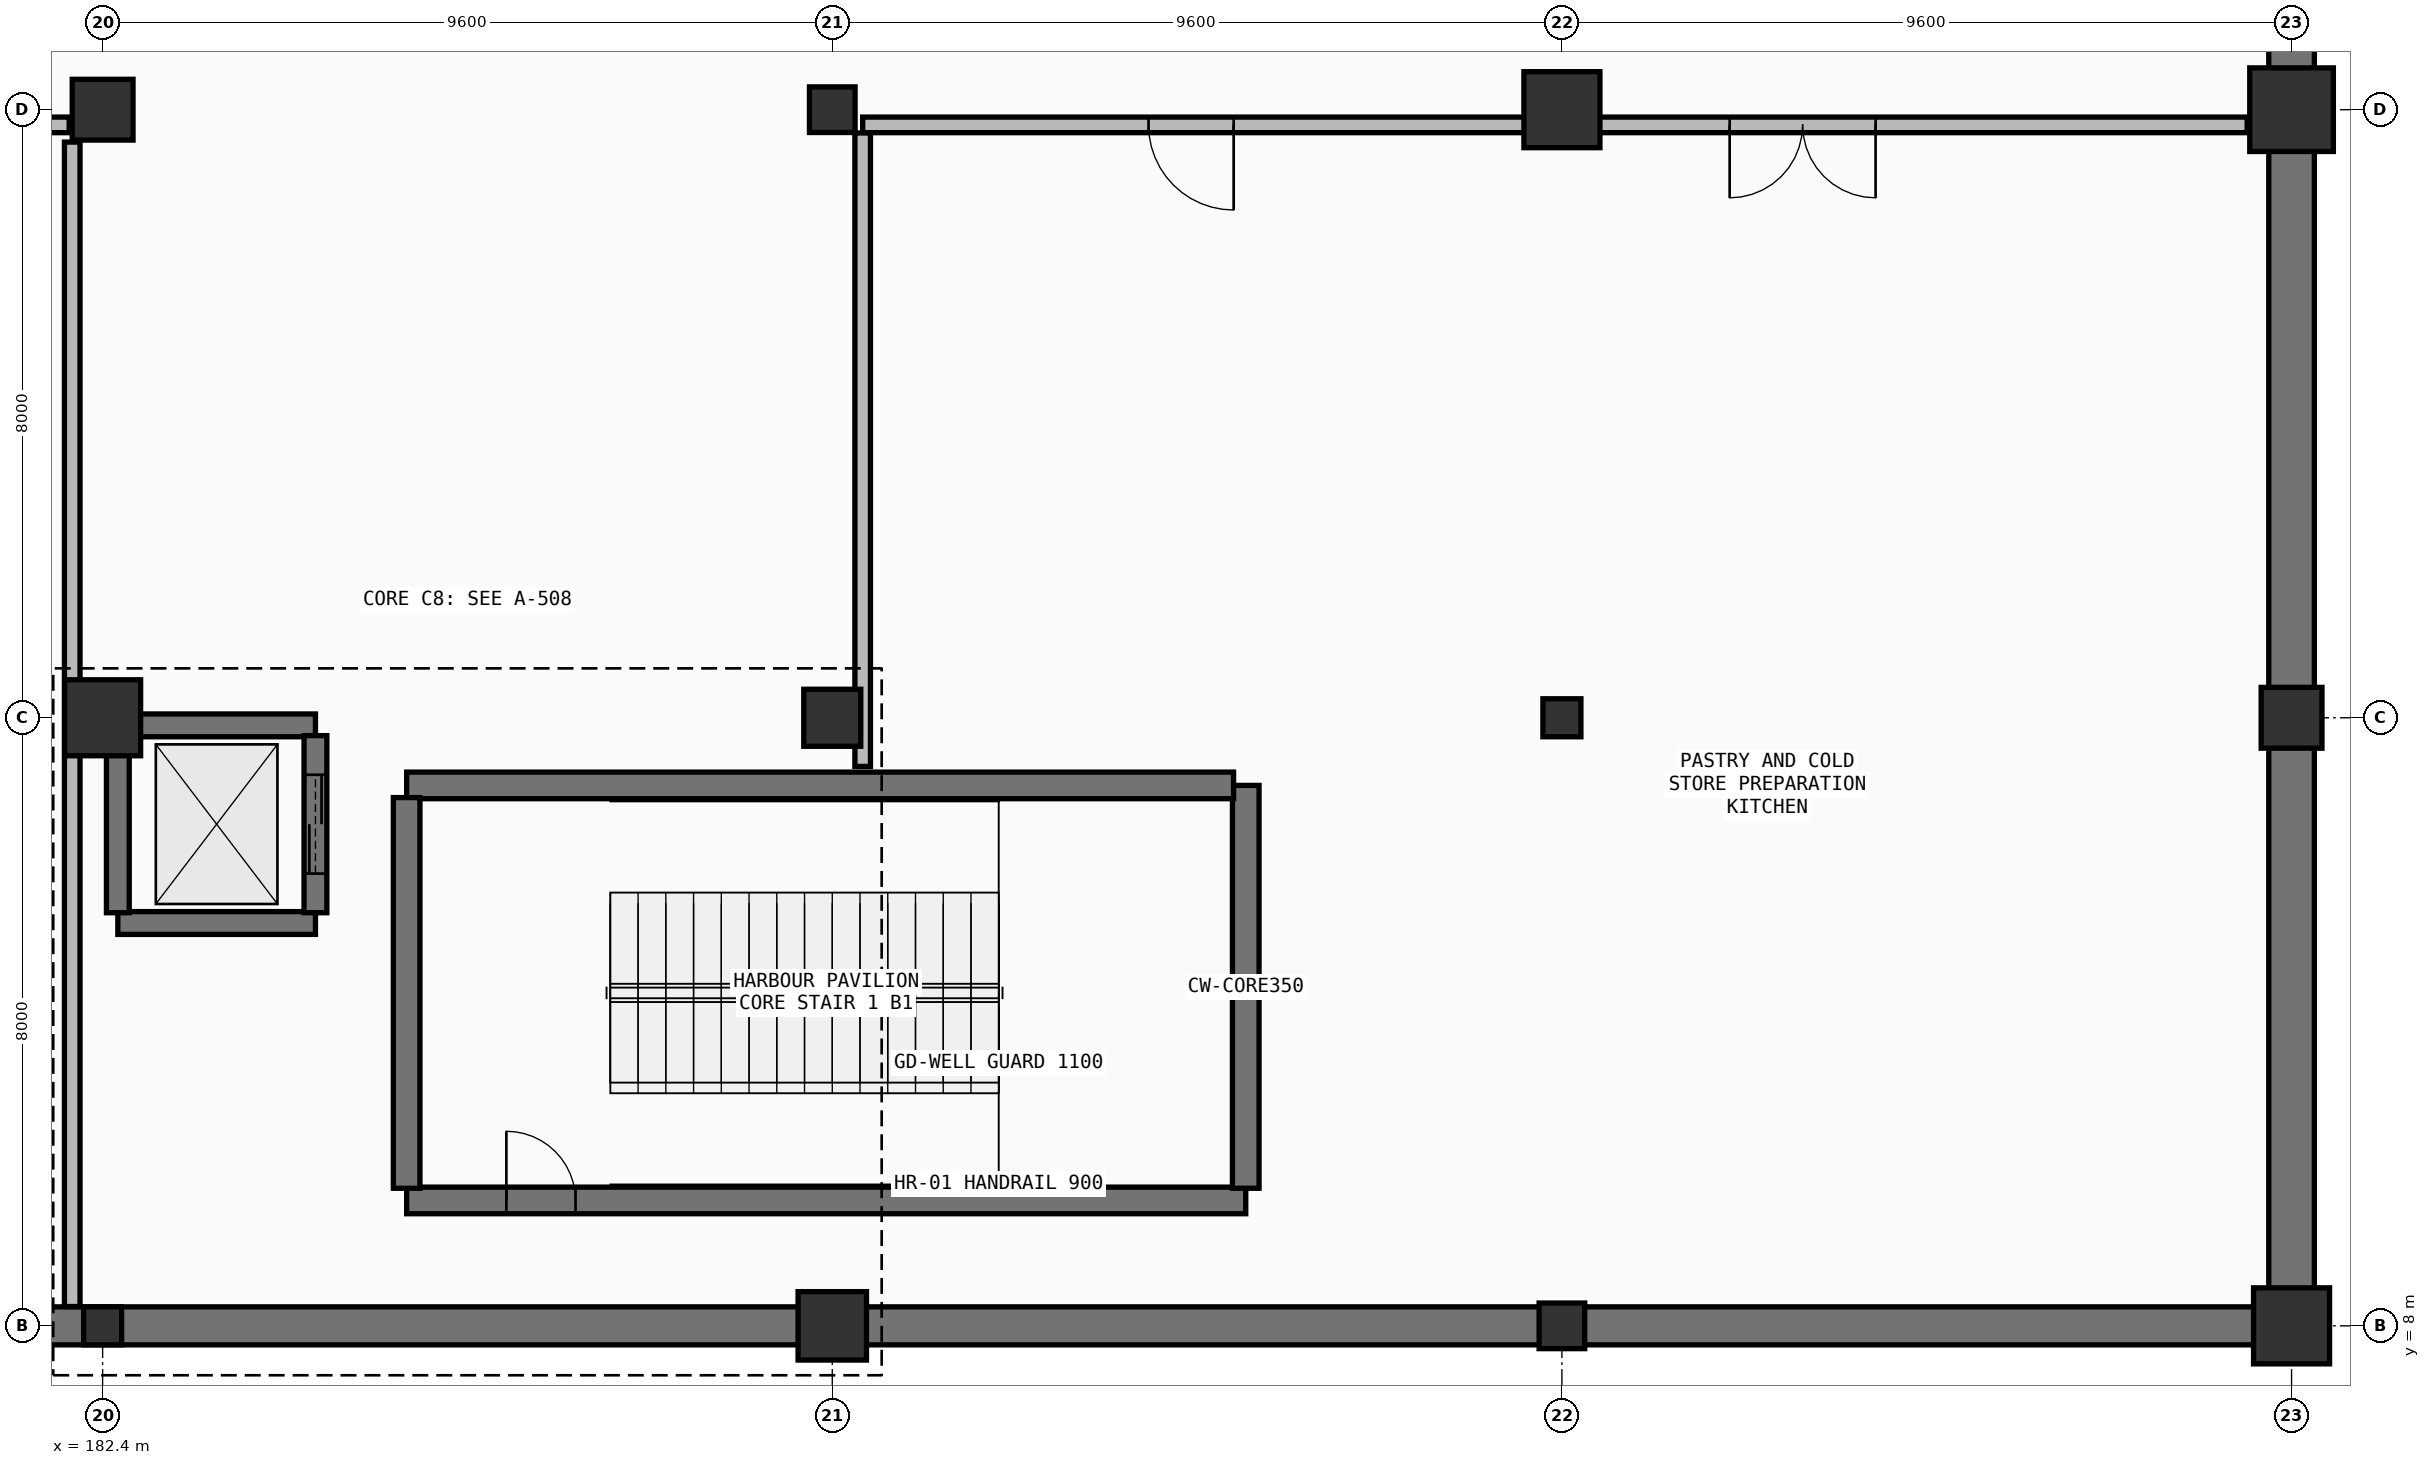
"""IFC4 building model, lengths in metres.
Left out: names, types, materials, properties, quantities, classifications, styles, units other than length and angle.
Written with IfcOpenShell. Run it as: python <this file> out.ifc"""

import sys

from ifc_helpers import new_model, si_unit, direction, frame, frame_2d, origin, origin_2d, place, context, subcontext, project, spatial, rectangle, circle, extrude, element, fill, save


model = new_model("IFC4")
c1 = context("Model", 3, precision=1e-05, world=origin(), true_north=direction((0.0, 1.0)))
c2 = subcontext(c1, "Body", "Model", "MODEL_VIEW")
j1 = project(units=[si_unit("LENGTHUNIT", "METRE"), si_unit("PLANEANGLEUNIT", "RADIAN")], contexts=[c1])
p1 = place(None, origin())
s1 = spatial("IfcSite", under=j1, at=p1, CompositionType="ELEMENT")
p2 = place(p1, origin())
s2 = spatial("IfcBuilding", under=s1, at=p2, CompositionType="ELEMENT")
p3 = place(p2, frame((0.0, 0.0, -5.4)))
s3 = spatial("IfcBuildingStorey", under=s2, at=p3, CompositionType="ELEMENT", Elevation=-5.4)
p4 = place(p3, frame((182.4, 8.0, 0.0), z_axis=(0.0, 0.0, 1.0), x_axis=(1.0, 0.0, 0.0)))
e1 = element("IfcColumn", 1, at=p4, inside=s3, PredefinedType="COLUMN", context=c2, shape_type="SweptSolid", body=[
    extrude(rectangle(XDim=0.5, YDim=0.5, at=origin_2d()), origin(), (0.0, 0.0, 1.0), 5.4),
])
p5 = place(p3, frame((182.4, 16.0, 0.0), z_axis=(0.0, 0.0, 1.0), x_axis=(1.0, 0.0, 0.0)))
e2 = element("IfcColumn", 2, at=p5, inside=s3, PredefinedType="COLUMN", context=c2, shape_type="SweptSolid", body=[
    extrude(circle(Radius=0.5, at=origin_2d()), origin(), (0.0, 0.0, 1.0), 5.4),
])
p6 = place(p3, frame((182.4, 24.0, 0.0), z_axis=(0.0, 0.0, 1.0), x_axis=(1.0, 0.0, 0.0)))
e3 = element("IfcColumn", 3, at=p6, inside=s3, PredefinedType="COLUMN", context=c2, shape_type="SweptSolid", body=[
    extrude(circle(Radius=0.4, at=origin_2d()), origin(), (0.0, 0.0, 1.0), 5.4),
])
p7 = place(p3, frame((192.0, 8.0, 0.0), z_axis=(0.0, 0.0, 1.0), x_axis=(1.0, 0.0, 0.0)))
e4 = element("IfcColumn", 4, at=p7, inside=s3, PredefinedType="COLUMN", context=c2, shape_type="SweptSolid", body=[
    extrude(rectangle(XDim=0.9, YDim=0.9, at=origin_2d()), origin(), (0.0, 0.0, 1.0), 5.4),
])
p8 = place(p3, frame((192.0, 16.0, 0.0), z_axis=(0.0, 0.0, 1.0), x_axis=(1.0, 0.0, 0.0)))
e5 = element("IfcColumn", 5, at=p8, inside=s3, PredefinedType="COLUMN", context=c2, shape_type="SweptSolid", body=[
    extrude(rectangle(XDim=0.75, YDim=0.75, at=origin_2d()), origin(), (0.0, 0.0, 1.0), 5.4),
])
for number, where, z_axis, x_axis in (
    (6, (192.0, 24.0, 0.0), (0.0, 0.0, 1.0), (1.0, 0.0, 0.0)),
    (7, (201.6, 8.0, 0.0), (0.0, 0.0, 1.0), (1.0, 0.0, 0.0)),
):
    element("IfcColumn", number, at=place(p3, frame(where, z_axis=z_axis, x_axis=x_axis)), inside=s3, PredefinedType="COLUMN", context=c2, shape_type="SweptSolid", body=[
        extrude(rectangle(XDim=0.6, YDim=0.6, at=origin_2d()), origin(), (0.0, 0.0, 1.0), 5.4),
    ])
p9 = place(p3, frame((201.6, 16.0, 0.0), z_axis=(0.0, 0.0, 1.0), x_axis=(1.0, 0.0, 0.0)))
e8 = element("IfcColumn", 8, at=p9, inside=s3, PredefinedType="COLUMN", context=c2, shape_type="SweptSolid", body=[
    extrude(rectangle(XDim=0.5, YDim=0.5, at=origin_2d()), origin(), (0.0, 0.0, 1.0), 5.4),
])
for number, where, z_axis, x_axis in (
    (9, (201.6, 24.0, 0.0), (0.0, 0.0, 1.0), (1.0, 0.0, 0.0)),
    (10, (211.2, 8.0, 0.0), (0.0, 0.0, 1.0), (1.0, 0.0, 0.0)),
):
    element("IfcColumn", number, at=place(p3, frame(where, z_axis=z_axis, x_axis=x_axis)), inside=s3, PredefinedType="COLUMN", context=c2, shape_type="SweptSolid", body=[
        extrude(circle(Radius=0.5, at=origin_2d()), origin(), (0.0, 0.0, 1.0), 5.4),
    ])
p10 = place(p3, frame((211.2, 16.0, 0.0), z_axis=(0.0, 0.0, 1.0), x_axis=(1.0, 0.0, 0.0)))
e11 = element("IfcColumn", 11, at=p10, inside=s3, PredefinedType="COLUMN", context=c2, shape_type="SweptSolid", body=[
    extrude(circle(Radius=0.4, at=origin_2d()), origin(), (0.0, 0.0, 1.0), 5.4),
])
p11 = place(p3, frame((211.2, 24.0, 0.0), z_axis=(0.0, 0.0, 1.0), x_axis=(1.0, 0.0, 0.0)))
e12 = element("IfcColumn", 12, at=p11, inside=s3, PredefinedType="COLUMN", context=c2, shape_type="SweptSolid", body=[
    extrude(rectangle(XDim=1.1, YDim=1.1, at=origin_2d()), origin(), (0.0, 0.0, 1.0), 5.4),
])
p12 = place(p3, frame((211.2, 64.0, 0.0), z_axis=(0.0, 0.0, 1.0), x_axis=(0.0, -1.0, 0.0)))
e13 = element("IfcWall", 13, at=p12, inside=s3, PredefinedType="SHEAR", context=c2, shape_type="SweptSolid", body=[
    extrude(rectangle(XDim=56.0, YDim=0.6, at=frame_2d((28.0, 0.0))), origin(), (0.0, 0.0, 1.0), 5.04),
])
p13 = place(p3, frame((210.915, 8.0, 0.0), z_axis=(0.0, 0.0, 1.0), x_axis=(-1.0, 0.0, 0.0)))
e14 = element("IfcWall", 14, at=p13, inside=s3, PredefinedType="SHEAR", context=c2, shape_type="SweptSolid", body=[
    extrude(rectangle(XDim=66.915, YDim=0.5, at=frame_2d((33.458, 0.0))), origin(), (0.0, 0.0, 1.0), 5.09),
])
p14 = place(p3, frame((186.4, 9.65, 0.0), z_axis=(0.0, 0.0, 1.0), x_axis=(1.0, 0.0, 0.0)))
e15 = element("IfcWall", 15, at=p14, inside=s3, PredefinedType="SHEAR", context=c2, shape_type="SweptSolid", body=[
    extrude(rectangle(XDim=11.04, YDim=0.35, at=frame_2d((5.52, 0.0))), origin(), (0.0, 0.0, 1.0), 5.09),
])
p15 = place(p14, frame((1.312, 0.0, 0.0)))
e16 = element("IfcOpeningElement", 16, at=p15, cuts=e15, PredefinedType="OPENING", context=c2, shape_type="SweptSolid", body=[
    extrude(rectangle(XDim=0.91, YDim=2.08, at=frame_2d((0.455, 1.04))), frame((0.0, 0.185, 0.0), z_axis=(0.0, -1.0, 0.0), x_axis=(1.0, 0.0, 0.0)), (0.0, 0.0, 1.0), 0.37),
])
p16 = place(p3, frame((197.44, 9.81, 0.0), z_axis=(0.0, 0.0, 1.0), x_axis=(0.0, 1.0, 0.0)))
e17 = element("IfcWall", 17, at=p16, inside=s3, PredefinedType="SHEAR", context=c2, shape_type="SweptSolid", body=[
    extrude(rectangle(XDim=5.3, YDim=0.35, at=frame_2d((2.65, 0.0))), origin(), (0.0, 0.0, 1.0), 5.09),
])
p17 = place(p3, frame((197.28, 15.11, 0.0), z_axis=(0.0, 0.0, 1.0), x_axis=(-1.0, 0.0, 0.0)))
e18 = element("IfcWall", 18, at=p17, inside=s3, PredefinedType="SHEAR", context=c2, shape_type="SweptSolid", body=[
    extrude(rectangle(XDim=10.88, YDim=0.35, at=frame_2d((5.44, 0.0))), origin(), (0.0, 0.0, 1.0), 5.09),
])
p18 = place(p3, frame((186.4, 14.95, 0.0), z_axis=(0.0, 0.0, 1.0), x_axis=(0.0, -1.0, 0.0)))
e19 = element("IfcWall", 19, at=p18, inside=s3, PredefinedType="SHEAR", context=c2, shape_type="SweptSolid", body=[
    extrude(rectangle(XDim=5.14, YDim=0.35, at=frame_2d((2.57, 0.0))), origin(), (0.0, 0.0, 1.0), 5.09),
])
for number, where, z_axis, x_axis in (
    (20, (185.2, 15.9, 0.0), (0.0, 0.0, 1.0), (-1.0, 0.0, 0.0)),
    (21, (182.6, 13.3, 0.0), (0.0, 0.0, 1.0), (1.0, 0.0, 0.0)),
):
    element("IfcWall", number, at=place(p3, frame(where, z_axis=z_axis, x_axis=x_axis)), inside=s3, PredefinedType="SHEAR", context=c2, shape_type="SweptSolid", body=[
        extrude(rectangle(XDim=2.6, YDim=0.3, at=frame_2d((1.3, 0.0))), origin(), (0.0, 0.0, 1.0), 5.09),
    ])
p19 = place(p3, frame((185.2, 13.435, 0.0), z_axis=(0.0, 0.0, 1.0), x_axis=(0.0, 1.0, 0.0)))
e22 = element("IfcWall", 22, at=p19, inside=s3, PredefinedType="SHEAR", context=c2, shape_type="SweptSolid", body=[
    extrude(rectangle(XDim=2.33, YDim=0.3, at=frame_2d((1.165, 0.0))), origin(), (0.0, 0.0, 1.0), 5.09),
])
p20 = place(p19, frame((0.515, 0.0, 0.0)))
e23 = element("IfcOpeningElement", 23, at=p20, cuts=e22, PredefinedType="OPENING", context=c2, shape_type="SweptSolid", body=[
    extrude(rectangle(XDim=1.3, YDim=2.22, at=frame_2d((0.65, 1.11))), frame((0.0, 0.16, 0.0), z_axis=(0.0, -1.0, 0.0), x_axis=(1.0, 0.0, 0.0)), (0.0, 0.0, 1.0), 0.32),
])
p21 = place(p3, frame((182.6, 15.765, 0.0), z_axis=(0.0, 0.0, 1.0), x_axis=(0.0, -1.0, 0.0)))
e24 = element("IfcWall", 24, at=p21, inside=s3, PredefinedType="SHEAR", context=c2, shape_type="SweptSolid", body=[
    extrude(rectangle(XDim=2.33, YDim=0.3, at=frame_2d((1.165, 0.0))), origin(), (0.0, 0.0, 1.0), 5.09),
])
p22 = place(p3, frame((181.96, 23.8, 0.0), z_axis=(0.0, 0.0, 1.0), x_axis=(-1.0, 0.0, 0.0)))
e25 = element("IfcWall", 25, at=p22, inside=s3, PredefinedType="SOLIDWALL", context=c2, shape_type="SweptSolid", body=[
    extrude(rectangle(XDim=37.44, YDim=0.205, at=frame_2d((18.72, 0.0))), origin(), (0.0, 0.0, 1.0), 4.36),
])
p23 = place(p22, frame((14.248, 0.0, 0.0)))
e26 = element("IfcOpeningElement", 26, at=p23, cuts=e25, PredefinedType="OPENING", context=c2, shape_type="SweptSolid", body=[
    extrude(rectangle(XDim=1.82, YDim=2.26, at=frame_2d((0.91, 1.13))), frame((0.0, 0.113, 0.0), z_axis=(0.0, -1.0, 0.0), x_axis=(1.0, 0.0, 0.0)), (0.0, 0.0, 1.0), 0.225),
])
p24 = place(p22, frame((30.17, 0.0, 0.0)))
e27 = element("IfcOpeningElement", 27, at=p24, cuts=e25, PredefinedType="OPENING", context=c2, shape_type="SweptSolid", body=[
    extrude(rectangle(XDim=1.09, YDim=2.18, at=frame_2d((0.545, 1.09))), frame((0.0, 0.113, 0.0), z_axis=(0.0, -1.0, 0.0), x_axis=(1.0, 0.0, 0.0)), (0.0, 0.0, 1.0), 0.225),
])
p25 = place(p3, frame((182.0, 8.254, 0.0), z_axis=(0.0, 0.0, 1.0), x_axis=(0.0, 1.0, 0.0)))
e28 = element("IfcWall", 28, at=p25, inside=s3, PredefinedType="SOLIDWALL", context=c2, shape_type="SweptSolid", body=[
    extrude(rectangle(XDim=15.32, YDim=0.205, at=frame_2d((7.66, 0.0))), origin(), (0.0, 0.0, 1.0), 4.46),
])
p26 = place(p3, frame((210.616, 23.8, 0.0), z_axis=(0.0, 0.0, 1.0), x_axis=(-1.0, 0.0, 0.0)))
e29 = element("IfcWall", 29, at=p26, inside=s3, PredefinedType="SOLIDWALL", context=c2, shape_type="SweptSolid", body=[
    extrude(rectangle(XDim=18.216, YDim=0.205, at=frame_2d((9.108, 0.0))), origin(), (0.0, 0.0, 1.0), 4.16),
])
p27 = place(p26, frame((4.889, 0.0, 0.0)))
e30 = element("IfcOpeningElement", 30, at=p27, cuts=e29, PredefinedType="OPENING", context=c2, shape_type="SweptSolid", body=[
    extrude(rectangle(XDim=1.92, YDim=2.3, at=frame_2d((0.96, 1.15))), frame((0.0, 0.113, 0.0), z_axis=(0.0, -1.0, 0.0), x_axis=(1.0, 0.0, 0.0)), (0.0, 0.0, 1.0), 0.225),
])
p28 = place(p26, frame((13.335, 0.0, 0.0)))
e31 = element("IfcOpeningElement", 31, at=p28, cuts=e29, PredefinedType="OPENING", context=c2, shape_type="SweptSolid", body=[
    extrude(rectangle(XDim=1.12, YDim=2.2, at=frame_2d((0.56, 1.1))), frame((0.0, 0.113, 0.0), z_axis=(0.0, -1.0, 0.0), x_axis=(1.0, 0.0, 0.0)), (0.0, 0.0, 1.0), 0.225),
])
p29 = place(p3, frame((192.4, 23.694, 0.0), z_axis=(0.0, 0.0, 1.0), x_axis=(0.0, -1.0, 0.0)))
e32 = element("IfcWall", 32, at=p29, inside=s3, PredefinedType="SOLIDWALL", context=c2, shape_type="SweptSolid", body=[
    extrude(rectangle(XDim=8.333, YDim=0.205, at=frame_2d((4.167, 0.0))), origin(), (0.0, 0.0, 1.0), 4.56),
])
p30 = place(p15, origin())
e33 = element("IfcDoor", 33, at=p30, inside=s3, OperationType="SINGLE_SWING_LEFT", PredefinedType="DOOR", context=c2, shape_type="SweptSolid", body=[
    extrude(rectangle(XDim=0.91, YDim=2.08, at=frame_2d((0.455, 1.04))), frame((0.0, 0.025, 0.0), z_axis=(0.0, -1.0, 0.0), x_axis=(1.0, 0.0, 0.0)), (0.0, 0.0, 1.0), 0.05),
])
fill(e16, e33)
p31 = place(p20, origin())
e34 = element("IfcDoor", 34, at=p31, inside=s3, OperationType="DOUBLE_DOOR_SLIDING", PredefinedType="DOOR", context=c2, shape_type="SweptSolid", body=[
    extrude(rectangle(XDim=1.3, YDim=2.22, at=frame_2d((0.65, 1.11))), frame((0.0, 0.025, 0.0), z_axis=(0.0, -1.0, 0.0), x_axis=(1.0, 0.0, 0.0)), (0.0, 0.0, 1.0), 0.05),
])
fill(e23, e34)
p32 = place(p27, origin())
e35 = element("IfcDoor", 35, at=p32, inside=s3, OperationType="DOUBLE_DOOR_SINGLE_SWING", PredefinedType="DOOR", context=c2, shape_type="SweptSolid", body=[
    extrude(rectangle(XDim=1.92, YDim=2.3, at=frame_2d((0.96, 1.15))), frame((0.0, 0.025, 0.0), z_axis=(0.0, -1.0, 0.0), x_axis=(1.0, 0.0, 0.0)), (0.0, 0.0, 1.0), 0.05),
])
fill(e30, e35)
p33 = place(p28, origin())
e36 = element("IfcDoor", 36, at=p33, inside=s3, OperationType="SINGLE_SWING_LEFT", PredefinedType="DOOR", context=c2, shape_type="SweptSolid", body=[
    extrude(rectangle(XDim=1.12, YDim=2.2, at=frame_2d((0.56, 1.1))), frame((0.0, 0.025, 0.0), z_axis=(0.0, -1.0, 0.0), x_axis=(1.0, 0.0, 0.0)), (0.0, 0.0, 1.0), 0.05),
])
fill(e31, e36)
save(model, sys.argv[1])
